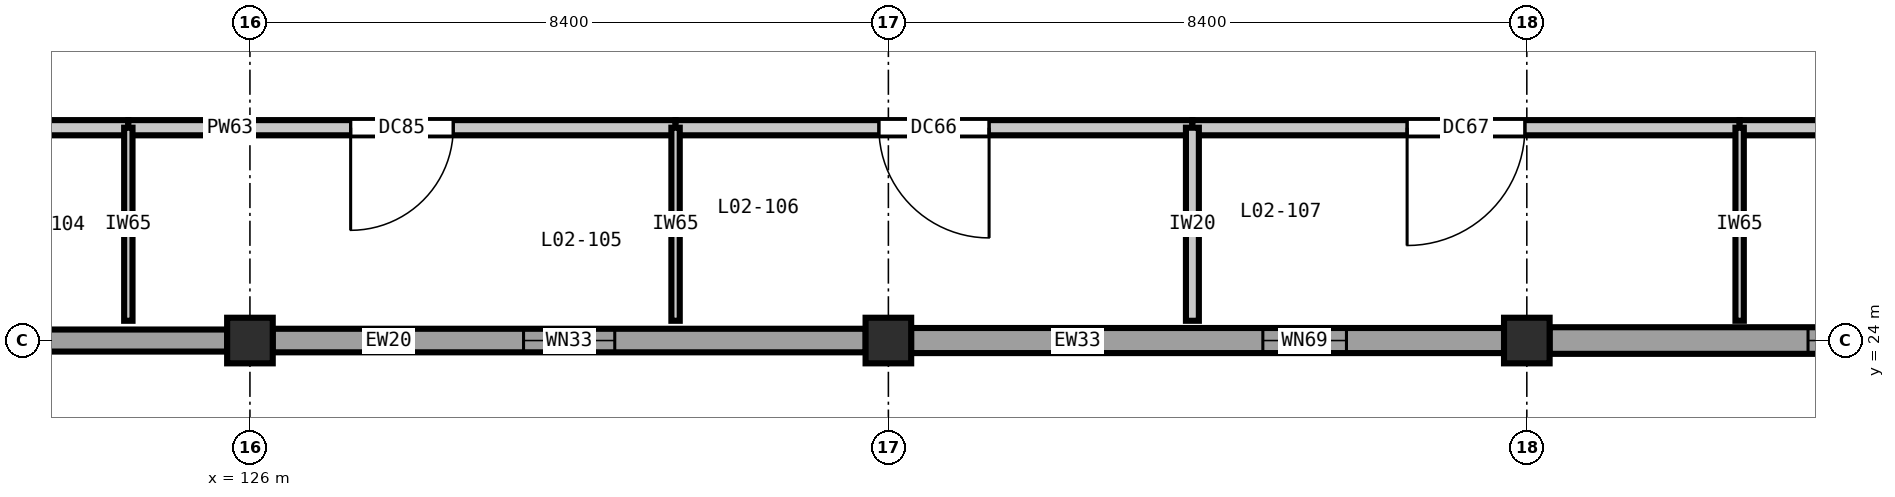
"""IFC4 building model, lengths in metres.
Left out: names, types, materials, properties, quantities, classifications, styles, units other than length and angle.
Written with IfcOpenShell. Run it as: python <this file> out.ifc"""

import sys

from ifc_helpers import new_model, si_unit, direction, frame, frame_2d, origin, origin_2d, place, context, subcontext, project, spatial, rectangle, extrude, element, fill, save


model = new_model("IFC4")
c1 = context("Model", 3, precision=1e-05, world=origin(), true_north=direction((0.0, 1.0)))
c2 = subcontext(c1, "Body", "Model", "MODEL_VIEW")
j1 = project(units=[si_unit("LENGTHUNIT", "METRE"), si_unit("PLANEANGLEUNIT", "RADIAN")], contexts=[c1])
p1 = place(None, origin())
s1 = spatial("IfcSite", under=j1, at=p1, CompositionType="ELEMENT")
p2 = place(p1, origin())
s2 = spatial("IfcBuilding", under=s1, at=p2, CompositionType="ELEMENT")
p3 = place(p2, frame((0.0, 0.0, 10.8)))
s3 = spatial("IfcBuildingStorey", under=s2, at=p3, CompositionType="ELEMENT", Elevation=10.8)
for number, where, z_axis, x_axis in (
    (1, (126.0, 24.0, 0.0), (0.0, 0.0, 1.0), (1.0, 0.0, 0.0)),
    (2, (134.4, 24.0, 0.0), (0.0, 0.0, 1.0), (1.0, 0.0, 0.0)),
    (3, (142.8, 24.0, 0.0), (0.0, 0.0, 1.0), (1.0, 0.0, 0.0)),
):
    element("IfcColumn", number, at=place(p3, frame(where, z_axis=z_axis, x_axis=x_axis)), inside=s3, PredefinedType="COLUMN", context=c2, shape_type="SweptSolid", body=[
        extrude(rectangle(XDim=0.6, YDim=0.6, at=origin_2d()), origin(), (0.0, 0.0, 1.0), 5.4),
    ])
p4 = place(p3, frame((150.902, 24.0, 0.0), z_axis=(0.0, 0.0, 1.0), x_axis=(-1.0, 0.0, 0.0)))
e4 = element("IfcWall", 4, at=p4, inside=s3, PredefinedType="SOLIDWALL", context=c2, shape_type="SweptSolid", body=[
    extrude(rectangle(XDim=7.804, YDim=0.35, at=frame_2d((3.902, 0.0))), origin(), (0.0, 0.0, 1.0), 4.68),
])
p5 = place(p4, frame((3.402, 0.0, 0.9)))
e5 = element("IfcOpeningElement", 5, at=p5, cuts=e4, PredefinedType="OPENING", context=c2, shape_type="SweptSolid", body=[
    extrude(rectangle(XDim=1.0, YDim=1.55, at=frame_2d((0.5, 0.775))), frame((0.0, 0.185, 0.0), z_axis=(0.0, -1.0, 0.0), x_axis=(1.0, 0.0, 0.0)), (0.0, 0.0, 1.0), 0.37),
])
p6 = place(p3, frame((142.502, 24.0, 0.0), z_axis=(0.0, 0.0, 1.0), x_axis=(-1.0, 0.0, 0.0)))
e6 = element("IfcWall", 6, at=p6, inside=s3, PredefinedType="SOLIDWALL", context=c2, shape_type="SweptSolid", body=[
    extrude(rectangle(XDim=7.804, YDim=0.33, at=frame_2d((3.902, 0.0))), origin(), (0.0, 0.0, 1.0), 4.68),
])
p7 = place(p6, frame((2.075, 0.0, 0.9)))
e7 = element("IfcOpeningElement", 7, at=p7, cuts=e6, PredefinedType="OPENING", context=c2, shape_type="SweptSolid", body=[
    extrude(rectangle(XDim=1.1, YDim=1.55, at=frame_2d((0.55, 0.775))), frame((0.0, 0.175, 0.0), z_axis=(0.0, -1.0, 0.0), x_axis=(1.0, 0.0, 0.0)), (0.0, 0.0, 1.0), 0.35),
])
p8 = place(p3, frame((134.102, 24.0, 0.0), z_axis=(0.0, 0.0, 1.0), x_axis=(-1.0, 0.0, 0.0)))
e8 = element("IfcWall", 8, at=p8, inside=s3, PredefinedType="SOLIDWALL", context=c2, shape_type="SweptSolid", body=[
    extrude(rectangle(XDim=7.804, YDim=0.31, at=frame_2d((3.902, 0.0))), origin(), (0.0, 0.0, 1.0), 4.68),
])
p9 = place(p8, frame((3.302, 0.0, 0.9)))
e9 = element("IfcOpeningElement", 9, at=p9, cuts=e8, PredefinedType="OPENING", context=c2, shape_type="SweptSolid", body=[
    extrude(rectangle(XDim=1.2, YDim=1.55, at=frame_2d((0.6, 0.775))), frame((0.0, 0.165, 0.0), z_axis=(0.0, -1.0, 0.0), x_axis=(1.0, 0.0, 0.0)), (0.0, 0.0, 1.0), 0.33),
])
p10 = place(p3, frame((125.702, 24.0, 0.0), z_axis=(0.0, 0.0, 1.0), x_axis=(-1.0, 0.0, 0.0)))
e10 = element("IfcWall", 10, at=p10, inside=s3, PredefinedType="SOLIDWALL", context=c2, shape_type="SweptSolid", body=[
    extrude(rectangle(XDim=7.804, YDim=0.29, at=frame_2d((3.902, 0.0))), origin(), (0.0, 0.0, 1.0), 4.68),
])
p11 = place(p10, frame((3.227, 0.0, 0.9)))
e11 = element("IfcOpeningElement", 11, at=p11, cuts=e10, PredefinedType="OPENING", context=c2, shape_type="SweptSolid", body=[
    extrude(rectangle(XDim=1.35, YDim=1.55, at=frame_2d((0.675, 0.775))), frame((0.0, 0.155, 0.0), z_axis=(0.0, -1.0, 0.0), x_axis=(1.0, 0.0, 0.0)), (0.0, 0.0, 1.0), 0.31),
])
p12 = place(p3, frame((117.86, 26.8, 0.0), z_axis=(0.0, 0.0, 1.0), x_axis=(1.0, 0.0, 0.0)))
e12 = element("IfcWall", 12, at=p12, inside=s3, PredefinedType="PARTITIONING", context=c2, shape_type="SweptSolid", body=[
    extrude(rectangle(XDim=6.54, YDim=0.2, at=frame_2d((3.27, 0.0))), origin(), (0.0, 0.0, 1.0), 5.07),
])
p13 = place(p12, frame((2.62, 0.0, 0.0)))
e13 = element("IfcOpeningElement", 13, at=p13, cuts=e12, PredefinedType="OPENING", context=c2, shape_type="SweptSolid", body=[
    extrude(rectangle(XDim=1.3, YDim=2.2, at=frame_2d((0.65, 1.1))), frame((0.0, 0.11, 0.0), z_axis=(0.0, -1.0, 0.0), x_axis=(1.0, 0.0, 0.0)), (0.0, 0.0, 1.0), 0.22),
])
p14 = place(p3, frame((124.4, 26.8, 0.0), z_axis=(0.0, 0.0, 1.0), x_axis=(1.0, 0.0, 0.0)))
e14 = element("IfcWall", 14, at=p14, inside=s3, PredefinedType="PARTITIONING", context=c2, shape_type="SweptSolid", body=[
    extrude(rectangle(XDim=7.2, YDim=0.2, at=frame_2d((3.6, 0.0))), origin(), (0.0, 0.0, 1.0), 5.07),
])
p15 = place(p14, frame((2.925, 0.0, 0.0)))
e15 = element("IfcOpeningElement", 15, at=p15, cuts=e14, PredefinedType="OPENING", context=c2, shape_type="SweptSolid", body=[
    extrude(rectangle(XDim=1.35, YDim=2.2, at=frame_2d((0.675, 1.1))), frame((0.0, 0.11, 0.0), z_axis=(0.0, -1.0, 0.0), x_axis=(1.0, 0.0, 0.0)), (0.0, 0.0, 1.0), 0.22),
])
p16 = place(p3, frame((131.6, 26.8, 0.0), z_axis=(0.0, 0.0, 1.0), x_axis=(1.0, 0.0, 0.0)))
e16 = element("IfcWall", 16, at=p16, inside=s3, PredefinedType="PARTITIONING", context=c2, shape_type="SweptSolid", body=[
    extrude(rectangle(XDim=6.8, YDim=0.2, at=frame_2d((3.4, 0.0))), origin(), (0.0, 0.0, 1.0), 5.07),
])
p17 = place(p16, frame((2.675, 0.0, 0.0)))
e17 = element("IfcOpeningElement", 17, at=p17, cuts=e16, PredefinedType="OPENING", context=c2, shape_type="SweptSolid", body=[
    extrude(rectangle(XDim=1.45, YDim=2.25, at=frame_2d((0.725, 1.125))), frame((0.0, 0.11, 0.0), z_axis=(0.0, -1.0, 0.0), x_axis=(1.0, 0.0, 0.0)), (0.0, 0.0, 1.0), 0.22),
])
p18 = place(p3, frame((138.4, 26.8, 0.0), z_axis=(0.0, 0.0, 1.0), x_axis=(1.0, 0.0, 0.0)))
e18 = element("IfcWall", 18, at=p18, inside=s3, PredefinedType="PARTITIONING", context=c2, shape_type="SweptSolid", body=[
    extrude(rectangle(XDim=7.2, YDim=0.2, at=frame_2d((3.6, 0.0))), origin(), (0.0, 0.0, 1.0), 5.07),
])
p19 = place(p18, frame((2.825, 0.0, 0.0)))
e19 = element("IfcOpeningElement", 19, at=p19, cuts=e18, PredefinedType="OPENING", context=c2, shape_type="SweptSolid", body=[
    extrude(rectangle(XDim=1.55, YDim=2.25, at=frame_2d((0.775, 1.125))), frame((0.0, 0.11, 0.0), z_axis=(0.0, -1.0, 0.0), x_axis=(1.0, 0.0, 0.0)), (0.0, 0.0, 1.0), 0.22),
])
p20 = place(p3, frame((145.6, 26.8, 0.0), z_axis=(0.0, 0.0, 1.0), x_axis=(1.0, 0.0, 0.0)))
e20 = element("IfcWall", 20, at=p20, inside=s3, PredefinedType="PARTITIONING", context=c2, shape_type="SweptSolid", body=[
    extrude(rectangle(XDim=5.6, YDim=0.2, at=frame_2d((2.8, 0.0))), origin(), (0.0, 0.0, 1.0), 5.07),
])
p21 = place(p20, frame((1.95, 0.0, 0.0)))
e21 = element("IfcOpeningElement", 21, at=p21, cuts=e20, PredefinedType="OPENING", context=c2, shape_type="SweptSolid", body=[
    extrude(rectangle(XDim=1.7, YDim=2.3, at=frame_2d((0.85, 1.15))), frame((0.0, 0.11, 0.0), z_axis=(0.0, -1.0, 0.0), x_axis=(1.0, 0.0, 0.0)), (0.0, 0.0, 1.0), 0.22),
])
for number, where, z_axis, x_axis in (
    (22, (124.4, 24.26, 0.0), (0.0, 0.0, 1.0), (0.0, 1.0, 0.0)),
    (23, (131.6, 24.26, 0.0), (0.0, 0.0, 1.0), (0.0, 1.0, 0.0)),
):
    element("IfcWall", number, at=place(p3, frame(where, z_axis=z_axis, x_axis=x_axis)), inside=s3, PredefinedType="PARTITIONING", context=c2, shape_type="SweptSolid", body=[
        extrude(rectangle(XDim=2.54, YDim=0.11, at=frame_2d((1.27, 0.0))), origin(), (0.0, 0.0, 1.0), 5.07),
    ])
p22 = place(p3, frame((138.4, 24.26, 0.0), z_axis=(0.0, 0.0, 1.0), x_axis=(0.0, 1.0, 0.0)))
e24 = element("IfcWall", 24, at=p22, inside=s3, PredefinedType="PARTITIONING", context=c2, shape_type="SweptSolid", body=[
    extrude(rectangle(XDim=2.54, YDim=0.17, at=frame_2d((1.27, 0.0))), origin(), (0.0, 0.0, 1.0), 5.07),
])
p23 = place(p3, frame((145.6, 24.26, 0.0), z_axis=(0.0, 0.0, 1.0), x_axis=(0.0, 1.0, 0.0)))
e25 = element("IfcWall", 25, at=p23, inside=s3, PredefinedType="PARTITIONING", context=c2, shape_type="SweptSolid", body=[
    extrude(rectangle(XDim=2.54, YDim=0.11, at=frame_2d((1.27, 0.0))), origin(), (0.0, 0.0, 1.0), 5.07),
])
p24 = place(p5, origin())
e26 = element("IfcWindow", 26, at=p24, inside=s3, PartitioningType="SINGLE_PANEL", PredefinedType="WINDOW", context=c2, shape_type="SweptSolid", body=[
    extrude(rectangle(XDim=1.0, YDim=1.55, at=frame_2d((0.5, 0.775))), frame((0.0, 0.03, 0.0), z_axis=(0.0, -1.0, 0.0), x_axis=(1.0, 0.0, 0.0)), (0.0, 0.0, 1.0), 0.06),
])
fill(e5, e26)
p25 = place(p7, origin())
e27 = element("IfcWindow", 27, at=p25, inside=s3, PartitioningType="SINGLE_PANEL", PredefinedType="WINDOW", context=c2, shape_type="SweptSolid", body=[
    extrude(rectangle(XDim=1.1, YDim=1.55, at=frame_2d((0.55, 0.775))), frame((0.0, 0.03, 0.0), z_axis=(0.0, -1.0, 0.0), x_axis=(1.0, 0.0, 0.0)), (0.0, 0.0, 1.0), 0.06),
])
fill(e7, e27)
p26 = place(p9, origin())
e28 = element("IfcWindow", 28, at=p26, inside=s3, PartitioningType="SINGLE_PANEL", PredefinedType="WINDOW", context=c2, shape_type="SweptSolid", body=[
    extrude(rectangle(XDim=1.2, YDim=1.55, at=frame_2d((0.6, 0.775))), frame((0.0, 0.03, 0.0), z_axis=(0.0, -1.0, 0.0), x_axis=(1.0, 0.0, 0.0)), (0.0, 0.0, 1.0), 0.06),
])
fill(e9, e28)
p27 = place(p15, frame((1.35, 0.0, 0.0), z_axis=(0.0, 0.0, 1.0), x_axis=(-1.0, 0.0, 0.0)))
e29 = element("IfcDoor", 29, at=p27, inside=s3, OperationType="SINGLE_SWING_RIGHT", PredefinedType="DOOR", context=c2, shape_type="SweptSolid", body=[
    extrude(rectangle(XDim=1.35, YDim=2.2, at=frame_2d((0.675, 1.1))), frame((0.0, 0.025, 0.0), z_axis=(0.0, -1.0, 0.0), x_axis=(1.0, 0.0, 0.0)), (0.0, 0.0, 1.0), 0.05),
])
fill(e15, e29)
p28 = place(p17, frame((1.45, 0.0, 0.0), z_axis=(0.0, 0.0, 1.0), x_axis=(-1.0, 0.0, 0.0)))
e30 = element("IfcDoor", 30, at=p28, inside=s3, OperationType="SINGLE_SWING_LEFT", PredefinedType="DOOR", context=c2, shape_type="SweptSolid", body=[
    extrude(rectangle(XDim=1.45, YDim=2.25, at=frame_2d((0.725, 1.125))), frame((0.0, 0.025, 0.0), z_axis=(0.0, -1.0, 0.0), x_axis=(1.0, 0.0, 0.0)), (0.0, 0.0, 1.0), 0.05),
])
fill(e17, e30)
p29 = place(p19, frame((1.55, 0.0, 0.0), z_axis=(0.0, 0.0, 1.0), x_axis=(-1.0, 0.0, 0.0)))
e31 = element("IfcDoor", 31, at=p29, inside=s3, OperationType="SINGLE_SWING_RIGHT", PredefinedType="DOOR", context=c2, shape_type="SweptSolid", body=[
    extrude(rectangle(XDim=1.55, YDim=2.25, at=frame_2d((0.775, 1.125))), frame((0.0, 0.025, 0.0), z_axis=(0.0, -1.0, 0.0), x_axis=(1.0, 0.0, 0.0)), (0.0, 0.0, 1.0), 0.05),
])
fill(e19, e31)
save(model, sys.argv[1])
